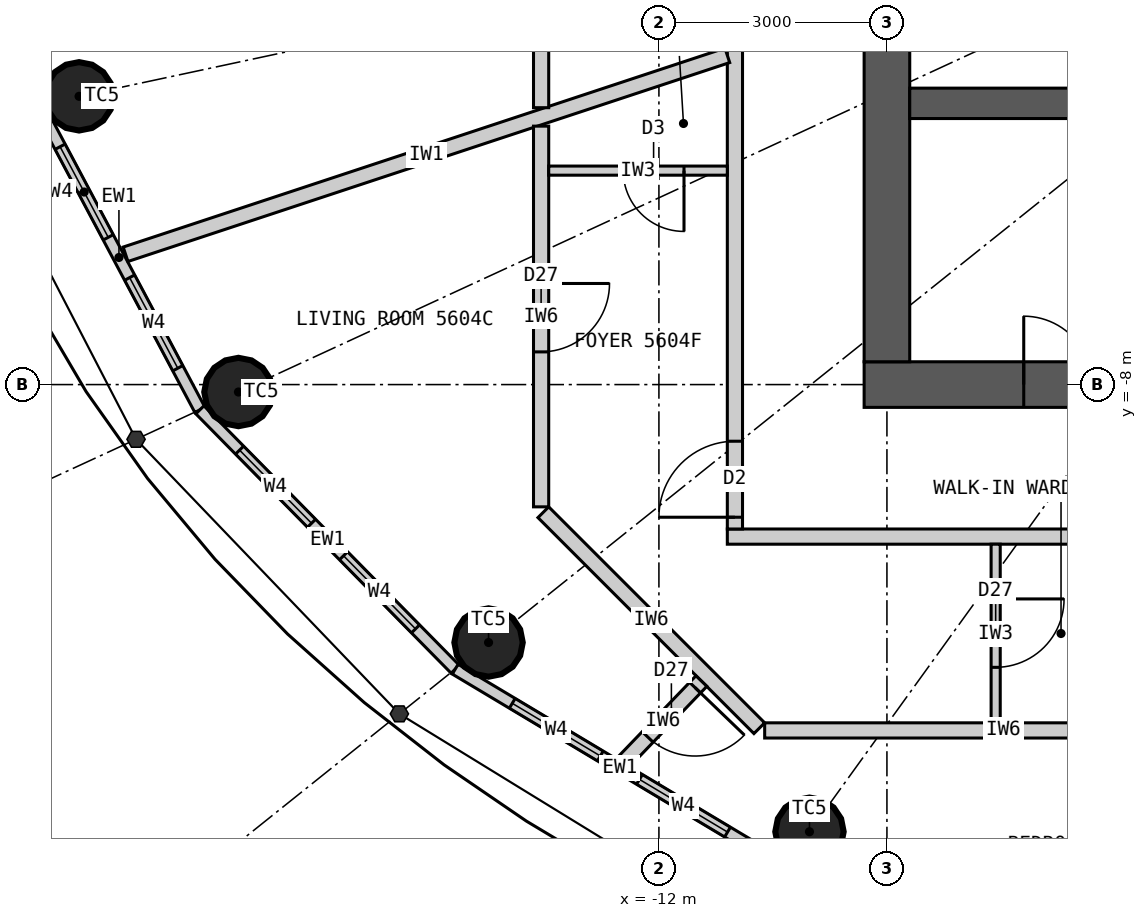
"""IFC4 building model, lengths in metres.
Left out: names, types, materials, properties, quantities, classifications, styles, units other than length and angle.
Written with IfcOpenShell. Run it as: python <this file> out.ifc"""

import sys

from ifc_helpers import new_model, si_unit, direction, frame, frame_2d, origin, origin_2d, place, context, subcontext, project, spatial, rectangle, circle, extrude, element, fill, save


model = new_model("IFC4")
c1 = context("Model", 3, precision=1e-05, world=origin(), true_north=direction((0.0, 1.0)))
c2 = subcontext(c1, "Body", "Model", "MODEL_VIEW")
j1 = project(units=[si_unit("LENGTHUNIT", "METRE"), si_unit("PLANEANGLEUNIT", "RADIAN")], contexts=[c1])
p1 = place(None, origin())
s1 = spatial("IfcSite", under=j1, at=p1, CompositionType="ELEMENT")
p2 = place(p1, origin())
s2 = spatial("IfcBuilding", under=s1, at=p2, CompositionType="ELEMENT")
p3 = place(p2, frame((0.0, 0.0, 209.4)))
s3 = spatial("IfcBuildingStorey", under=s2, at=p3, CompositionType="ELEMENT", Elevation=209.4)
for number, where, z_axis, x_axis in (
    (1, (-19.629, -4.208, 0.0), (0.0, 0.0, 1.0), (1.0, 0.0, 0.0)),
    (2, (-17.532, -8.098, 0.0), (0.0, 0.0, 1.0), (1.0, 0.0, 0.0)),
    (3, (-14.241, -11.393, 0.0), (0.0, 0.0, 1.0), (1.0, 0.0, 0.0)),
    (4, (-10.019, -13.883, 0.0), (0.0, 0.0, 1.0), (1.0, 0.0, 0.0)),
):
    element("IfcColumn", number, at=place(p3, frame(where, z_axis=z_axis, x_axis=x_axis)), inside=s3, PredefinedType="COLUMN", context=c2, shape_type="SweptSolid", body=[
        extrude(circle(Radius=0.45, at=origin_2d()), origin(), (0.0, 0.0, 1.0), 3.3),
    ])
p4 = place(p3, frame((9.3, -8.0, 0.0), z_axis=(0.0, 0.0, 1.0), x_axis=(-1.0, 0.0, 0.0)))
e5 = element("IfcWall", 5, at=p4, inside=s3, PredefinedType="SHEAR", context=c2, shape_type="SweptSolid", body=[
    extrude(rectangle(XDim=18.6, YDim=0.6, at=frame_2d((9.3, 0.0))), origin(), (0.0, 0.0, 1.0), 3.3),
])
p5 = place(p4, frame((8.0, 0.0, 0.0)))
e6 = element("IfcOpeningElement", 6, at=p5, cuts=e5, PredefinedType="OPENING", context=c2, shape_type="SweptSolid", body=[
    extrude(rectangle(XDim=1.2, YDim=2.2, at=frame_2d((0.6, 1.1))), frame((0.0, 0.31, 0.0), z_axis=(0.0, -1.0, 0.0), x_axis=(1.0, 0.0, 0.0)), (0.0, 0.0, 1.0), 0.62),
])
p6 = place(p4, frame((15.6, 0.0, 0.0)))
e7 = element("IfcOpeningElement", 7, at=p6, cuts=e5, PredefinedType="OPENING", context=c2, shape_type="SweptSolid", body=[
    extrude(rectangle(XDim=0.9, YDim=2.2, at=frame_2d((0.45, 1.1))), frame((0.0, 0.31, 0.0), z_axis=(0.0, -1.0, 0.0), x_axis=(1.0, 0.0, 0.0)), (0.0, 0.0, 1.0), 0.62),
])
p7 = place(p3, frame((-9.0, 7.7, 0.0), z_axis=(0.0, 0.0, 1.0), x_axis=(0.0, -1.0, 0.0)))
e8 = element("IfcWall", 8, at=p7, inside=s3, PredefinedType="SHEAR", context=c2, shape_type="SweptSolid", body=[
    extrude(rectangle(XDim=15.4, YDim=0.6, at=frame_2d((7.7, 0.0))), origin(), (0.0, 0.0, 1.0), 3.3),
])
p8 = place(p7, frame((6.8, 0.0, 0.0)))
e9 = element("IfcOpeningElement", 9, at=p8, cuts=e8, PredefinedType="OPENING", context=c2, shape_type="SweptSolid", body=[
    extrude(rectangle(XDim=1.8, YDim=2.2, at=frame_2d((0.9, 1.1))), frame((0.0, 0.31, 0.0), z_axis=(0.0, -1.0, 0.0), x_axis=(1.0, 0.0, 0.0)), (0.0, 0.0, 1.0), 0.62),
])
p9 = place(p3, frame((-8.7, -4.3, 0.0), z_axis=(0.0, 0.0, 1.0), x_axis=(1.0, 0.0, 0.0)))
e10 = element("IfcWall", 10, at=p9, inside=s3, PredefinedType="SHEAR", context=c2, shape_type="SweptSolid", body=[
    extrude(rectangle(XDim=17.4, YDim=0.4, at=frame_2d((8.7, 0.0))), origin(), (0.0, 0.0, 1.0), 3.3),
])
p10 = place(p3, frame((-20.17, -4.323, 0.0), z_axis=(0.0, 0.0, 1.0), x_axis=(0.469256152955, -0.883062094597, 0.0)))
e11 = element("IfcWall", 11, at=p10, inside=s3, PredefinedType="ELEMENTEDWALL", context=c2, shape_type="SweptSolid", body=[
    extrude(rectangle(XDim=4.539, YDim=0.15, at=frame_2d((2.27, 0.0))), origin(), (0.0, 0.0, 1.0), 3.12),
])
p11 = place(p10, frame((0.62, 0.0, 0.9)))
e12 = element("IfcOpeningElement", 12, at=p11, cuts=e11, PredefinedType="OPENING", context=c2, shape_type="SweptSolid", body=[
    extrude(rectangle(XDim=1.35, YDim=1.9, at=frame_2d((0.675, 0.95))), frame((0.0, 0.085, 0.0), z_axis=(0.0, -1.0, 0.0), x_axis=(1.0, 0.0, 0.0)), (0.0, 0.0, 1.0), 0.17),
])
p12 = place(p10, frame((2.57, 0.0, 0.9)))
e13 = element("IfcOpeningElement", 13, at=p12, cuts=e11, PredefinedType="OPENING", context=c2, shape_type="SweptSolid", body=[
    extrude(rectangle(XDim=1.35, YDim=1.9, at=frame_2d((0.675, 0.95))), frame((0.0, 0.085, 0.0), z_axis=(0.0, -1.0, 0.0), x_axis=(1.0, 0.0, 0.0)), (0.0, 0.0, 1.0), 0.17),
])
p13 = place(p3, frame((-18.04, -8.332, 0.0), z_axis=(0.0, 0.0, 1.0), x_axis=(0.701527379618, -0.712642501993, 0.0)))
e14 = element("IfcWall", 14, at=p13, inside=s3, PredefinedType="ELEMENTEDWALL", context=c2, shape_type="SweptSolid", body=[
    extrude(rectangle(XDim=4.788, YDim=0.15, at=frame_2d((2.394, 0.0))), origin(), (0.0, 0.0, 1.0), 3.12),
])
p14 = place(p13, frame((0.744, 0.0, 0.9)))
e15 = element("IfcOpeningElement", 15, at=p14, cuts=e14, PredefinedType="OPENING", context=c2, shape_type="SweptSolid", body=[
    extrude(rectangle(XDim=1.35, YDim=1.9, at=frame_2d((0.675, 0.95))), frame((0.0, 0.085, 0.0), z_axis=(0.0, -1.0, 0.0), x_axis=(1.0, 0.0, 0.0)), (0.0, 0.0, 1.0), 0.17),
])
p15 = place(p13, frame((2.694, 0.0, 0.9)))
e16 = element("IfcOpeningElement", 16, at=p15, cuts=e14, PredefinedType="OPENING", context=c2, shape_type="SweptSolid", body=[
    extrude(rectangle(XDim=1.35, YDim=1.9, at=frame_2d((0.675, 0.95))), frame((0.0, 0.085, 0.0), z_axis=(0.0, -1.0, 0.0), x_axis=(1.0, 0.0, 0.0)), (0.0, 0.0, 1.0), 0.17),
])
p16 = place(p3, frame((-14.68, -11.744, 0.0), z_axis=(0.0, 0.0, 1.0), x_axis=(0.85822150553, -0.513279502265, 0.0)))
e17 = element("IfcWall", 17, at=p16, inside=s3, PredefinedType="ELEMENTEDWALL", context=c2, shape_type="SweptSolid", body=[
    extrude(rectangle(XDim=5.05, YDim=0.15, at=frame_2d((2.525, 0.0))), origin(), (0.0, 0.0, 1.0), 3.12),
])
p17 = place(p16, frame((0.875, 0.0, 0.9)))
e18 = element("IfcOpeningElement", 18, at=p17, cuts=e17, PredefinedType="OPENING", context=c2, shape_type="SweptSolid", body=[
    extrude(rectangle(XDim=1.35, YDim=1.9, at=frame_2d((0.675, 0.95))), frame((0.0, 0.085, 0.0), z_axis=(0.0, -1.0, 0.0), x_axis=(1.0, 0.0, 0.0)), (0.0, 0.0, 1.0), 0.17),
])
p18 = place(p16, frame((2.825, 0.0, 0.9)))
e19 = element("IfcOpeningElement", 19, at=p18, cuts=e17, PredefinedType="OPENING", context=c2, shape_type="SweptSolid", body=[
    extrude(rectangle(XDim=1.35, YDim=1.9, at=frame_2d((0.675, 0.95))), frame((0.0, 0.085, 0.0), z_axis=(0.0, -1.0, 0.0), x_axis=(1.0, 0.0, 0.0)), (0.0, 0.0, 1.0), 0.17),
])
p19 = place(p3, frame((11.1, -10.0, 0.0), z_axis=(0.0, 0.0, 1.0), x_axis=(-1.0, 0.0, 0.0)))
e20 = element("IfcWall", 20, at=p19, inside=s3, PredefinedType="PARTITIONING", context=c2, shape_type="SweptSolid", body=[
    extrude(rectangle(XDim=22.2, YDim=0.2, at=frame_2d((11.1, 0.0))), origin(), (0.0, 0.0, 1.0), 3.12),
])
p20 = place(p19, frame((11.36, 0.0, 0.0)))
e21 = element("IfcOpeningElement", 21, at=p20, cuts=e20, PredefinedType="OPENING", context=c2, shape_type="SweptSolid", body=[
    extrude(rectangle(XDim=1.0, YDim=2.2, at=frame_2d((0.5, 1.1))), frame((0.0, 0.11, 0.0), z_axis=(0.0, -1.0, 0.0), x_axis=(1.0, 0.0, 0.0)), (0.0, 0.0, 1.0), 0.22),
])
p21 = place(p19, frame((0.595, 0.0, 0.0)))
e22 = element("IfcOpeningElement", 22, at=p21, cuts=e20, PredefinedType="OPENING", context=c2, shape_type="SweptSolid", body=[
    extrude(rectangle(XDim=1.0, YDim=2.2, at=frame_2d((0.5, 1.1))), frame((0.0, 0.11, 0.0), z_axis=(0.0, -1.0, 0.0), x_axis=(1.0, 0.0, 0.0)), (0.0, 0.0, 1.0), 0.22),
])
p22 = place(p3, frame((-11.0, 9.9, 0.0), z_axis=(0.0, 0.0, 1.0), x_axis=(0.0, -1.0, 0.0)))
e23 = element("IfcWall", 23, at=p22, inside=s3, PredefinedType="PARTITIONING", context=c2, shape_type="SweptSolid", body=[
    extrude(rectangle(XDim=19.8, YDim=0.2, at=frame_2d((9.9, 0.0))), origin(), (0.0, 0.0, 1.0), 3.12),
])
p23 = place(p22, frame((5.075, 0.0, 0.0)))
e24 = element("IfcOpeningElement", 24, at=p23, cuts=e23, PredefinedType="OPENING", context=c2, shape_type="SweptSolid", body=[
    extrude(rectangle(XDim=1.0, YDim=2.2, at=frame_2d((0.5, 1.1))), frame((0.0, 0.11, 0.0), z_axis=(0.0, -1.0, 0.0), x_axis=(1.0, 0.0, 0.0)), (0.0, 0.0, 1.0), 0.22),
])
p24 = place(p22, frame((18.645, 0.0, 0.0)))
e25 = element("IfcOpeningElement", 25, at=p24, cuts=e23, PredefinedType="OPENING", context=c2, shape_type="SweptSolid", body=[
    extrude(rectangle(XDim=1.0, YDim=2.2, at=frame_2d((0.5, 1.1))), frame((0.0, 0.11, 0.0), z_axis=(0.0, -1.0, 0.0), x_axis=(1.0, 0.0, 0.0)), (0.0, 0.0, 1.0), 0.22),
])
p25 = place(p3, frame((-11.1, -3.669, 0.0), z_axis=(0.0, 0.0, 1.0), x_axis=(-0.949476668397, -0.313837627079, 0.0)))
e26 = element("IfcWall", 26, at=p25, inside=s3, PredefinedType="PARTITIONING", context=c2, shape_type="SweptSolid", body=[
    extrude(rectangle(XDim=8.339, YDim=0.2, at=frame_2d((4.169, 0.0))), origin(), (0.0, 0.0, 1.0), 3.12),
])
p26 = place(p3, frame((-13.55, 8.139, 0.0), z_axis=(0.0, 0.0, 1.0), x_axis=(0.0, -1.0, 0.0)))
e27 = element("IfcWall", 27, at=p26, inside=s3, PredefinedType="PARTITIONING", context=c2, shape_type="SweptSolid", body=[
    extrude(rectangle(XDim=12.496, YDim=0.2, at=frame_2d((6.248, 0.0))), origin(), (0.0, 0.0, 1.0), 3.12),
])
p27 = place(p26, frame((7.031, 0.0, 0.0)))
e28 = element("IfcOpeningElement", 28, at=p27, cuts=e27, PredefinedType="OPENING", context=c2, shape_type="SweptSolid", body=[
    extrude(rectangle(XDim=0.9, YDim=2.1, at=frame_2d((0.45, 1.05))), frame((0.0, 0.11, 0.0), z_axis=(0.0, -1.0, 0.0), x_axis=(1.0, 0.0, 0.0)), (0.0, 0.0, 1.0), 0.22),
])
p28 = place(p26, frame((9.373, 0.0, 0.0)))
e29 = element("IfcOpeningElement", 29, at=p28, cuts=e27, PredefinedType="OPENING", context=c2, shape_type="SweptSolid", body=[
    extrude(rectangle(XDim=0.8, YDim=2.1, at=frame_2d((0.4, 1.05))), frame((0.0, 0.11, 0.0), z_axis=(0.0, -1.0, 0.0), x_axis=(1.0, 0.0, 0.0)), (0.0, 0.0, 1.0), 0.22),
])
p29 = place(p26, frame((3.789, 0.0, 0.0)))
e30 = element("IfcOpeningElement", 30, at=p29, cuts=e27, PredefinedType="OPENING", context=c2, shape_type="SweptSolid", body=[
    extrude(rectangle(XDim=0.9, YDim=2.1, at=frame_2d((0.45, 1.05))), frame((0.0, 0.11, 0.0), z_axis=(0.0, -1.0, 0.0), x_axis=(1.0, 0.0, 0.0)), (0.0, 0.0, 1.0), 0.22),
])
p30 = place(p3, frame((-13.55, -4.6, 0.0), z_axis=(0.0, 0.0, 1.0), x_axis=(0.0, -1.0, 0.0)))
e31 = element("IfcWall", 31, at=p30, inside=s3, PredefinedType="PARTITIONING", context=c2, shape_type="SweptSolid", body=[
    extrude(rectangle(XDim=5.009, YDim=0.2, at=frame_2d((2.504, 0.0))), origin(), (0.0, 0.0, 1.0), 3.12),
])
p31 = place(p30, frame((2.07, 0.0, 0.0)))
e32 = element("IfcOpeningElement", 32, at=p31, cuts=e31, PredefinedType="OPENING", context=c2, shape_type="SweptSolid", body=[
    extrude(rectangle(XDim=0.9, YDim=2.1, at=frame_2d((0.45, 1.05))), frame((0.0, 0.11, 0.0), z_axis=(0.0, -1.0, 0.0), x_axis=(1.0, 0.0, 0.0)), (0.0, 0.0, 1.0), 0.22),
])
p32 = place(p3, frame((-13.521, -9.679, 0.0), z_axis=(0.0, 0.0, 1.0), x_axis=(0.707106781187, -0.707106781187, 0.0)))
e33 = element("IfcWall", 33, at=p32, inside=s3, PredefinedType="PARTITIONING", context=c2, shape_type="SweptSolid", body=[
    extrude(rectangle(XDim=4.019, YDim=0.2, at=frame_2d((2.009, 0.0))), origin(), (0.0, 0.0, 1.0), 3.12),
])
p33 = place(p3, frame((-10.609, -12.55, 0.0), z_axis=(0.0, 0.0, 1.0), x_axis=(1.0, 0.0, 0.0)))
e34 = element("IfcWall", 34, at=p33, inside=s3, PredefinedType="PARTITIONING", context=c2, shape_type="SweptSolid", body=[
    extrude(rectangle(XDim=6.284, YDim=0.2, at=frame_2d((3.142, 0.0))), origin(), (0.0, 0.0, 1.0), 3.12),
])
p34 = place(p33, frame((4.944, 0.0, 0.0)))
e35 = element("IfcOpeningElement", 35, at=p34, cuts=e34, PredefinedType="OPENING", context=c2, shape_type="SweptSolid", body=[
    extrude(rectangle(XDim=0.8, YDim=2.1, at=frame_2d((0.4, 1.05))), frame((0.0, 0.11, 0.0), z_axis=(0.0, -1.0, 0.0), x_axis=(1.0, 0.0, 0.0)), (0.0, 0.0, 1.0), 0.22),
])
p35 = place(p3, frame((-11.441, -11.9, 0.0), z_axis=(0.0, 0.0, 1.0), x_axis=(-0.692958717259, -0.720977264672, 0.0)))
e36 = element("IfcWall", 36, at=p35, inside=s3, PredefinedType="PARTITIONING", context=c2, shape_type="SweptSolid", body=[
    extrude(rectangle(XDim=1.464, YDim=0.2, at=frame_2d((0.732, 0.0))), origin(), (0.0, 0.0, 1.0), 3.12),
])
p36 = place(p35, frame((0.12, 0.0, 0.0)))
e37 = element("IfcOpeningElement", 37, at=p36, cuts=e36, PredefinedType="OPENING", context=c2, shape_type="SweptSolid", body=[
    extrude(rectangle(XDim=0.9, YDim=2.1, at=frame_2d((0.45, 1.05))), frame((0.0, 0.11, 0.0), z_axis=(0.0, -1.0, 0.0), x_axis=(1.0, 0.0, 0.0)), (0.0, 0.0, 1.0), 0.22),
])
p37 = place(p3, frame((-11.1, -5.185, 0.0), z_axis=(0.0, 0.0, 1.0), x_axis=(-1.0, 0.0, 0.0)))
e38 = element("IfcWall", 38, at=p37, inside=s3, PredefinedType="PARTITIONING", context=c2, shape_type="SweptSolid", body=[
    extrude(rectangle(XDim=2.35, YDim=0.12, at=frame_2d((1.175, 0.0))), origin(), (0.0, 0.0, 1.0), 3.12),
])
p38 = place(p37, frame((0.57, 0.0, 0.0)))
e39 = element("IfcOpeningElement", 39, at=p38, cuts=e38, PredefinedType="OPENING", context=c2, shape_type="SweptSolid", body=[
    extrude(rectangle(XDim=0.8, YDim=2.1, at=frame_2d((0.4, 1.05))), frame((0.0, 0.07, 0.0), z_axis=(0.0, -1.0, 0.0), x_axis=(1.0, 0.0, 0.0)), (0.0, 0.0, 1.0), 0.14),
])
p39 = place(p3, frame((-7.569, -10.1, 0.0), z_axis=(0.0, 0.0, 1.0), x_axis=(0.0, -1.0, 0.0)))
e40 = element("IfcWall", 40, at=p39, inside=s3, PredefinedType="PARTITIONING", context=c2, shape_type="SweptSolid", body=[
    extrude(rectangle(XDim=2.35, YDim=0.12, at=frame_2d((1.175, 0.0))), origin(), (0.0, 0.0, 1.0), 3.12),
])
p40 = place(p39, frame((0.72, 0.0, 0.0)))
e41 = element("IfcOpeningElement", 41, at=p40, cuts=e40, PredefinedType="OPENING", context=c2, shape_type="SweptSolid", body=[
    extrude(rectangle(XDim=0.9, YDim=2.1, at=frame_2d((0.45, 1.05))), frame((0.0, 0.07, 0.0), z_axis=(0.0, -1.0, 0.0), x_axis=(1.0, 0.0, 0.0)), (0.0, 0.0, 1.0), 0.14),
])
p41 = place(p11, origin())
e42 = element("IfcWindow", 42, at=p41, inside=s3, PartitioningType="SINGLE_PANEL", PredefinedType="WINDOW", context=c2, shape_type="SweptSolid", body=[
    extrude(rectangle(XDim=1.35, YDim=1.9, at=frame_2d((0.675, 0.95))), frame((0.0, 0.03, 0.0), z_axis=(0.0, -1.0, 0.0), x_axis=(1.0, 0.0, 0.0)), (0.0, 0.0, 1.0), 0.06),
])
fill(e12, e42)
p42 = place(p12, origin())
e43 = element("IfcWindow", 43, at=p42, inside=s3, PartitioningType="SINGLE_PANEL", PredefinedType="WINDOW", context=c2, shape_type="SweptSolid", body=[
    extrude(rectangle(XDim=1.35, YDim=1.9, at=frame_2d((0.675, 0.95))), frame((0.0, 0.03, 0.0), z_axis=(0.0, -1.0, 0.0), x_axis=(1.0, 0.0, 0.0)), (0.0, 0.0, 1.0), 0.06),
])
fill(e13, e43)
p43 = place(p14, origin())
e44 = element("IfcWindow", 44, at=p43, inside=s3, PartitioningType="SINGLE_PANEL", PredefinedType="WINDOW", context=c2, shape_type="SweptSolid", body=[
    extrude(rectangle(XDim=1.35, YDim=1.9, at=frame_2d((0.675, 0.95))), frame((0.0, 0.03, 0.0), z_axis=(0.0, -1.0, 0.0), x_axis=(1.0, 0.0, 0.0)), (0.0, 0.0, 1.0), 0.06),
])
fill(e15, e44)
p44 = place(p15, origin())
e45 = element("IfcWindow", 45, at=p44, inside=s3, PartitioningType="SINGLE_PANEL", PredefinedType="WINDOW", context=c2, shape_type="SweptSolid", body=[
    extrude(rectangle(XDim=1.35, YDim=1.9, at=frame_2d((0.675, 0.95))), frame((0.0, 0.03, 0.0), z_axis=(0.0, -1.0, 0.0), x_axis=(1.0, 0.0, 0.0)), (0.0, 0.0, 1.0), 0.06),
])
fill(e16, e45)
p45 = place(p17, origin())
e46 = element("IfcWindow", 46, at=p45, inside=s3, PartitioningType="SINGLE_PANEL", PredefinedType="WINDOW", context=c2, shape_type="SweptSolid", body=[
    extrude(rectangle(XDim=1.35, YDim=1.9, at=frame_2d((0.675, 0.95))), frame((0.0, 0.03, 0.0), z_axis=(0.0, -1.0, 0.0), x_axis=(1.0, 0.0, 0.0)), (0.0, 0.0, 1.0), 0.06),
])
fill(e18, e46)
p46 = place(p18, origin())
e47 = element("IfcWindow", 47, at=p46, inside=s3, PartitioningType="SINGLE_PANEL", PredefinedType="WINDOW", context=c2, shape_type="SweptSolid", body=[
    extrude(rectangle(XDim=1.35, YDim=1.9, at=frame_2d((0.675, 0.95))), frame((0.0, 0.03, 0.0), z_axis=(0.0, -1.0, 0.0), x_axis=(1.0, 0.0, 0.0)), (0.0, 0.0, 1.0), 0.06),
])
fill(e19, e47)
p47 = place(p24, origin())
e48 = element("IfcDoor", 48, at=p47, inside=s3, OperationType="SINGLE_SWING_RIGHT", PredefinedType="DOOR", context=c2, shape_type="SweptSolid", body=[
    extrude(rectangle(XDim=1.0, YDim=2.2, at=frame_2d((0.5, 1.1))), frame((0.0, 0.025, 0.0), z_axis=(0.0, -1.0, 0.0), x_axis=(1.0, 0.0, 0.0)), (0.0, 0.0, 1.0), 0.05),
])
fill(e25, e48)
p48 = place(p38, origin())
e49 = element("IfcDoor", 49, at=p48, inside=s3, OperationType="SINGLE_SWING_LEFT", PredefinedType="DOOR", context=c2, shape_type="SweptSolid", body=[
    extrude(rectangle(XDim=0.8, YDim=2.1, at=frame_2d((0.4, 1.05))), frame((0.0, 0.025, 0.0), z_axis=(0.0, -1.0, 0.0), x_axis=(1.0, 0.0, 0.0)), (0.0, 0.0, 1.0), 0.05),
])
fill(e39, e49)
p49 = place(p40, origin())
e50 = element("IfcDoor", 50, at=p49, inside=s3, OperationType="SINGLE_SWING_LEFT", PredefinedType="DOOR", context=c2, shape_type="SweptSolid", body=[
    extrude(rectangle(XDim=0.9, YDim=2.1, at=frame_2d((0.45, 1.05))), frame((0.0, 0.025, 0.0), z_axis=(0.0, -1.0, 0.0), x_axis=(1.0, 0.0, 0.0)), (0.0, 0.0, 1.0), 0.05),
])
fill(e41, e50)
p50 = place(p31, origin())
e51 = element("IfcDoor", 51, at=p50, inside=s3, OperationType="SINGLE_SWING_LEFT", PredefinedType="DOOR", context=c2, shape_type="SweptSolid", body=[
    extrude(rectangle(XDim=0.9, YDim=2.1, at=frame_2d((0.45, 1.05))), frame((0.0, 0.025, 0.0), z_axis=(0.0, -1.0, 0.0), x_axis=(1.0, 0.0, 0.0)), (0.0, 0.0, 1.0), 0.05),
])
fill(e32, e51)
p51 = place(p36, origin())
e52 = element("IfcDoor", 52, at=p51, inside=s3, OperationType="SINGLE_SWING_LEFT", PredefinedType="DOOR", context=c2, shape_type="SweptSolid", body=[
    extrude(rectangle(XDim=0.9, YDim=2.1, at=frame_2d((0.45, 1.05))), frame((0.0, 0.025, 0.0), z_axis=(0.0, -1.0, 0.0), x_axis=(1.0, 0.0, 0.0)), (0.0, 0.0, 1.0), 0.05),
])
fill(e37, e52)
p52 = place(p6, origin())
e53 = element("IfcDoor", 53, at=p52, inside=s3, OperationType="SINGLE_SWING_RIGHT", PredefinedType="DOOR", context=c2, shape_type="SweptSolid", body=[
    extrude(rectangle(XDim=0.9, YDim=2.2, at=frame_2d((0.45, 1.1))), frame((0.0, 0.025, 0.0), z_axis=(0.0, -1.0, 0.0), x_axis=(1.0, 0.0, 0.0)), (0.0, 0.0, 1.0), 0.05),
])
fill(e7, e53)
save(model, sys.argv[1])
